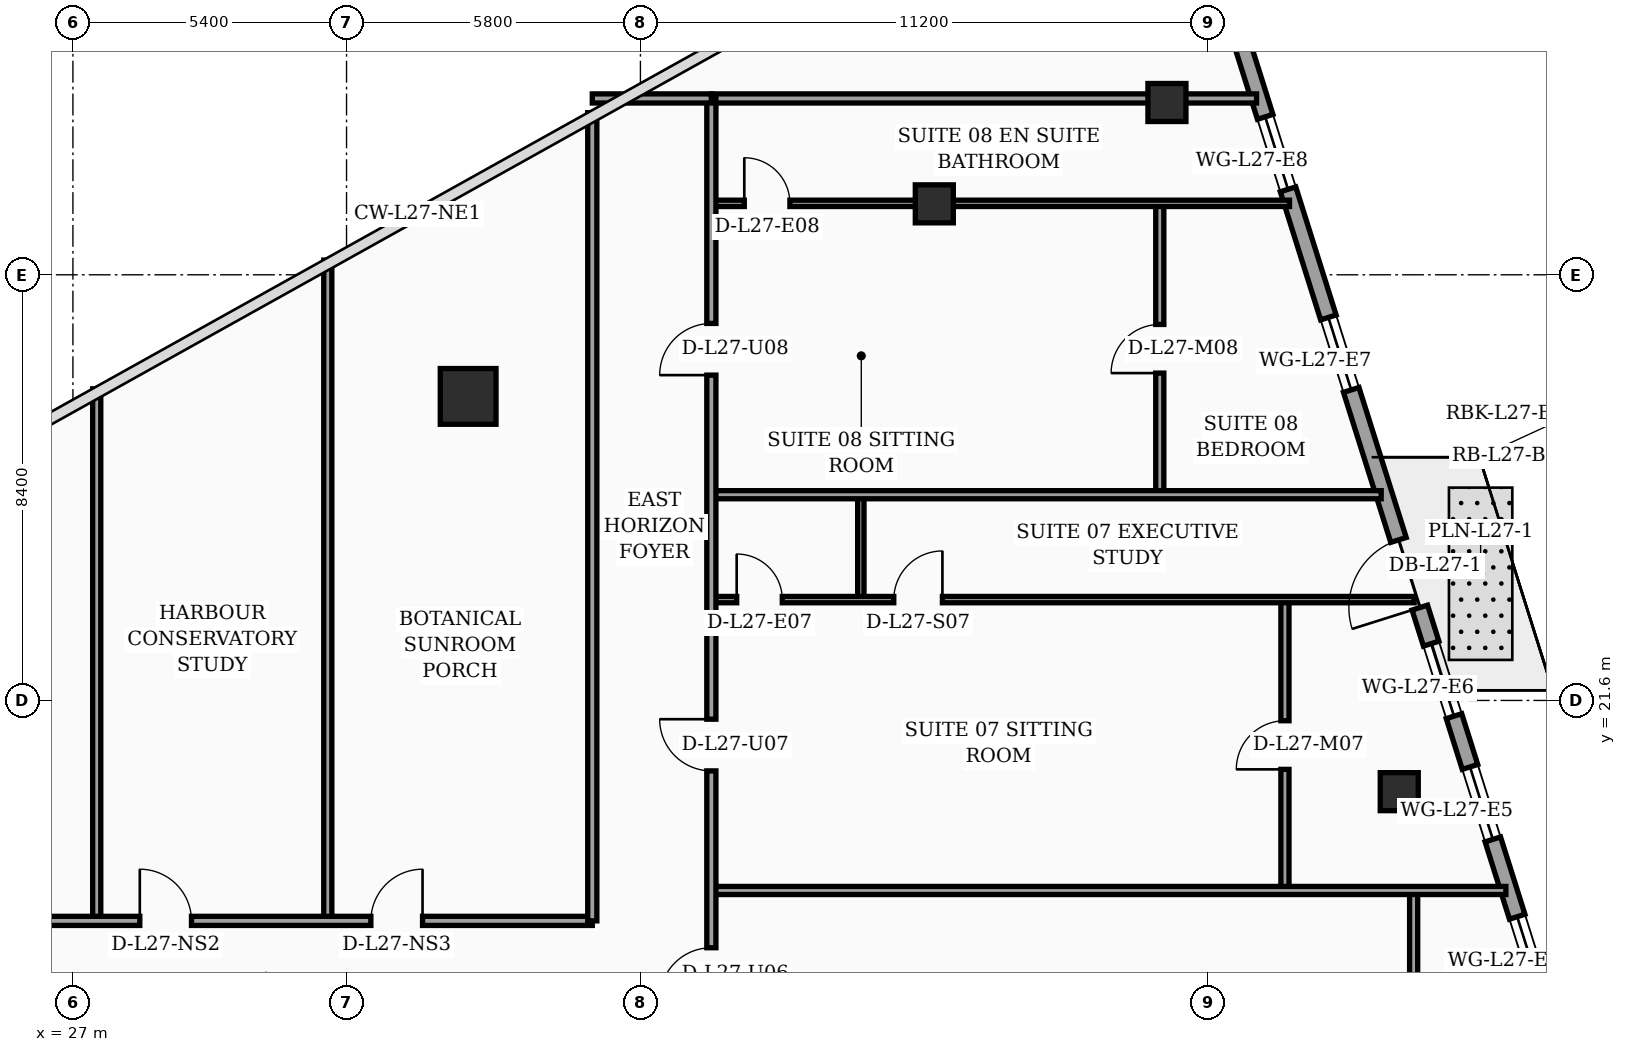
"""IFC4 building model, lengths in metres.
Left out: names, types, materials, properties, quantities, classifications, styles, units other than length and angle.
Written with IfcOpenShell. Run it as: python <this file> out.ifc"""

import sys

from ifc_helpers import new_model, si_unit, direction, frame, frame_2d, origin, origin_2d, place, context, subcontext, project, spatial, rectangle, hollow_rectangle, circle, extrude, element, fill, save


model = new_model("IFC4")
c1 = context("Model", 3, precision=1e-05, world=origin(), true_north=direction((0.0, 1.0)))
c2 = subcontext(c1, "Body", "Model", "MODEL_VIEW")
j1 = project(units=[si_unit("LENGTHUNIT", "METRE"), si_unit("PLANEANGLEUNIT", "RADIAN")], contexts=[c1])
p1 = place(None, origin())
s1 = spatial("IfcSite", under=j1, at=p1, CompositionType="ELEMENT")
p2 = place(p1, origin())
s2 = spatial("IfcBuilding", under=s1, at=p2, CompositionType="ELEMENT")
p3 = place(p2, frame((0.0, 0.0, 112.6)))
s3 = spatial("IfcBuildingStorey", under=s2, at=p3, CompositionType="ELEMENT", Elevation=112.6)
p4 = place(p3, frame((34.8, 27.6, 0.0), z_axis=(0.0, 0.0, 1.0), x_axis=(1.0, 0.0, 0.0)))
e1 = element("IfcColumn", 1, at=p4, inside=s3, PredefinedType="COLUMN", context=c2, shape_type="SweptSolid", body=[
    extrude(circle(Radius=0.55, at=origin_2d()), origin(), (0.0, 0.0, 1.0), 3.56),
])
for number, where, z_axis, x_axis in (
    (2, (44.0, 31.4, 0.0), (0.0, 0.0, 1.0), (1.0, 0.0, 0.0)),
    (3, (53.176, 19.8, 0.0), (0.0, 0.0, 1.0), (1.0, 0.0, 0.0)),
    (4, (48.591, 33.4, 0.0), (0.0, 0.0, 1.0), (1.0, 0.0, 0.0)),
):
    element("IfcColumn", number, at=place(p3, frame(where, z_axis=z_axis, x_axis=x_axis)), inside=s3, PredefinedType="COLUMN", context=c2, shape_type="SweptSolid", body=[
        extrude(hollow_rectangle(XDim=0.75, YDim=0.75, WallThickness=0.032, at=origin_2d()), origin(), (0.0, 0.0, 1.0), 3.56),
    ])
p5 = place(p3, frame((59.23, 5.505, 0.0), z_axis=(0.0, 0.0, 1.0), x_axis=(-0.300509063924, 0.953778958931, 0.0)))
e5 = element("IfcWall", 5, at=p5, inside=s3, PredefinedType="SOLIDWALL", context=c2, shape_type="SweptSolid", body=[
    extrude(rectangle(XDim=30.814, YDim=0.32, at=frame_2d((15.407, 0.0))), origin(), (0.0, 0.0, 1.0), 3.56),
])
p6 = place(p5, frame((18.796, 0.0, 0.0)))
e6 = element("IfcOpeningElement", 6, at=p6, cuts=e5, PredefinedType="OPENING", context=c2, shape_type="SweptSolid", body=[
    extrude(rectangle(XDim=1.4, YDim=2.25, at=frame_2d((0.7, 1.125))), frame((0.0, 0.17, 0.0), z_axis=(0.0, -1.0, 0.0), x_axis=(1.0, 0.0, 0.0)), (0.0, 0.0, 1.0), 0.34),
])
p7 = place(p5, frame((2.65, 0.0, 0.75)))
e7 = element("IfcOpeningElement", 7, at=p7, cuts=e5, PredefinedType="OPENING", context=c2, shape_type="SweptSolid", body=[
    extrude(rectangle(XDim=1.5, YDim=1.6, at=frame_2d((0.75, 0.8))), frame((0.0, 0.17, 0.0), z_axis=(0.0, -1.0, 0.0), x_axis=(1.0, 0.0, 0.0)), (0.0, 0.0, 1.0), 0.34),
])
p8 = place(p5, frame((4.7, 0.0, 0.75)))
e8 = element("IfcOpeningElement", 8, at=p8, cuts=e5, PredefinedType="OPENING", context=c2, shape_type="SweptSolid", body=[
    extrude(rectangle(XDim=1.5, YDim=1.6, at=frame_2d((0.75, 0.8))), frame((0.0, 0.17, 0.0), z_axis=(0.0, -1.0, 0.0), x_axis=(1.0, 0.0, 0.0)), (0.0, 0.0, 1.0), 0.34),
])
p9 = place(p5, frame((7.8, 0.0, 0.75)))
e9 = element("IfcOpeningElement", 9, at=p9, cuts=e5, PredefinedType="OPENING", context=c2, shape_type="SweptSolid", body=[
    extrude(rectangle(XDim=1.5, YDim=1.6, at=frame_2d((0.75, 0.8))), frame((0.0, 0.17, 0.0), z_axis=(0.0, -1.0, 0.0), x_axis=(1.0, 0.0, 0.0)), (0.0, 0.0, 1.0), 0.34),
])
p10 = place(p5, frame((10.9, 0.0, 0.75)))
e10 = element("IfcOpeningElement", 10, at=p10, cuts=e5, PredefinedType="OPENING", context=c2, shape_type="SweptSolid", body=[
    extrude(rectangle(XDim=1.5, YDim=1.6, at=frame_2d((0.75, 0.8))), frame((0.0, 0.17, 0.0), z_axis=(0.0, -1.0, 0.0), x_axis=(1.0, 0.0, 0.0)), (0.0, 0.0, 1.0), 0.34),
])
p11 = place(p5, frame((14.0, 0.0, 0.75)))
e11 = element("IfcOpeningElement", 11, at=p11, cuts=e5, PredefinedType="OPENING", context=c2, shape_type="SweptSolid", body=[
    extrude(rectangle(XDim=1.5, YDim=1.6, at=frame_2d((0.75, 0.8))), frame((0.0, 0.17, 0.0), z_axis=(0.0, -1.0, 0.0), x_axis=(1.0, 0.0, 0.0)), (0.0, 0.0, 1.0), 0.34),
])
p12 = place(p5, frame((16.55, 0.0, 0.75)))
e12 = element("IfcOpeningElement", 12, at=p12, cuts=e5, PredefinedType="OPENING", context=c2, shape_type="SweptSolid", body=[
    extrude(rectangle(XDim=1.5, YDim=1.6, at=frame_2d((0.75, 0.8))), frame((0.0, 0.17, 0.0), z_axis=(0.0, -1.0, 0.0), x_axis=(1.0, 0.0, 0.0)), (0.0, 0.0, 1.0), 0.34),
])
p13 = place(p5, frame((23.3, 0.0, 0.75)))
e13 = element("IfcOpeningElement", 13, at=p13, cuts=e5, PredefinedType="OPENING", context=c2, shape_type="SweptSolid", body=[
    extrude(rectangle(XDim=1.5, YDim=1.6, at=frame_2d((0.75, 0.8))), frame((0.0, 0.17, 0.0), z_axis=(0.0, -1.0, 0.0), x_axis=(1.0, 0.0, 0.0)), (0.0, 0.0, 1.0), 0.34),
])
p14 = place(p5, frame((27.45, 0.0, 0.75)))
e14 = element("IfcOpeningElement", 14, at=p14, cuts=e5, PredefinedType="OPENING", context=c2, shape_type="SweptSolid", body=[
    extrude(rectangle(XDim=1.5, YDim=1.6, at=frame_2d((0.75, 0.8))), frame((0.0, 0.17, 0.0), z_axis=(0.0, -1.0, 0.0), x_axis=(1.0, 0.0, 0.0)), (0.0, 0.0, 1.0), 0.34),
])
p15 = place(p3, frame((27.47, 17.25, 0.0), z_axis=(0.0, 0.0, 1.0), x_axis=(0.0, 1.0, 0.0)))
e15 = element("IfcWall", 15, at=p15, inside=s3, PredefinedType="PARTITIONING", context=c2, shape_type="SweptSolid", body=[
    extrude(rectangle(XDim=10.5, YDim=0.16, at=frame_2d((5.25, 0.0))), origin(), (0.0, 0.0, 1.0), 2.84),
])
p16 = place(p3, frame((32.03, 17.25, 0.0), z_axis=(0.0, 0.0, 1.0), x_axis=(0.0, 1.0, 0.0)))
e16 = element("IfcWall", 16, at=p16, inside=s3, PredefinedType="PARTITIONING", context=c2, shape_type="SweptSolid", body=[
    extrude(rectangle(XDim=13.04, YDim=0.16, at=frame_2d((6.52, 0.0))), origin(), (0.0, 0.0, 1.0), 2.84),
])
p17 = place(p3, frame((21.5, 17.25, 0.0), z_axis=(0.0, 0.0, 1.0), x_axis=(1.0, 0.0, 0.0)))
e17 = element("IfcWall", 17, at=p17, inside=s3, PredefinedType="PARTITIONING", context=c2, shape_type="SweptSolid", body=[
    extrude(rectangle(XDim=15.75, YDim=0.18, at=frame_2d((7.875, 0.0))), origin(), (0.0, 0.0, 1.0), 2.84),
])
p18 = place(p17, frame((0.95, 0.0, 0.0)))
e18 = element("IfcOpeningElement", 18, at=p18, cuts=e17, PredefinedType="OPENING", context=c2, shape_type="SweptSolid", body=[
    extrude(rectangle(XDim=1.02, YDim=2.2, at=frame_2d((0.51, 1.1))), frame((0.0, 0.1, 0.0), z_axis=(0.0, -1.0, 0.0), x_axis=(1.0, 0.0, 0.0)), (0.0, 0.0, 1.0), 0.2),
])
p19 = place(p17, frame((6.82, 0.0, 0.0)))
e19 = element("IfcOpeningElement", 19, at=p19, cuts=e17, PredefinedType="OPENING", context=c2, shape_type="SweptSolid", body=[
    extrude(rectangle(XDim=1.02, YDim=2.2, at=frame_2d((0.51, 1.1))), frame((0.0, 0.1, 0.0), z_axis=(0.0, -1.0, 0.0), x_axis=(1.0, 0.0, 0.0)), (0.0, 0.0, 1.0), 0.2),
])
p20 = place(p17, frame((11.38, 0.0, 0.0)))
e20 = element("IfcOpeningElement", 20, at=p20, cuts=e17, PredefinedType="OPENING", context=c2, shape_type="SweptSolid", body=[
    extrude(rectangle(XDim=1.02, YDim=2.2, at=frame_2d((0.51, 1.1))), frame((0.0, 0.1, 0.0), z_axis=(0.0, -1.0, 0.0), x_axis=(1.0, 0.0, 0.0)), (0.0, 0.0, 1.0), 0.2),
])
p21 = place(p3, frame((37.25, 17.25, 0.0), z_axis=(0.0, 0.0, 1.0), x_axis=(0.0, 1.0, 0.0)))
e21 = element("IfcWall", 21, at=p21, inside=s3, PredefinedType="PARTITIONING", context=c2, shape_type="SweptSolid", body=[
    extrude(rectangle(XDim=15.95, YDim=0.18, at=frame_2d((7.975, 0.0))), origin(), (0.0, 0.0, 1.0), 2.84),
])
p22 = place(p3, frame((53.46, 7.45, 0.0), z_axis=(0.0, 0.0, 1.0), x_axis=(0.0, 1.0, 0.0)))
e22 = element("IfcWall", 22, at=p22, inside=s3, PredefinedType="PARTITIONING", context=c2, shape_type="SweptSolid", body=[
    extrude(rectangle(XDim=10.4, YDim=0.16, at=frame_2d((5.2, 0.0))), origin(), (0.0, 0.0, 1.0), 3.04),
])
p23 = place(p22, frame((4.72, 0.0, 0.0)))
e23 = element("IfcOpeningElement", 23, at=p23, cuts=e22, PredefinedType="OPENING", context=c2, shape_type="SweptSolid", body=[
    extrude(rectangle(XDim=0.96, YDim=2.2, at=frame_2d((0.48, 1.1))), frame((0.0, 0.09, 0.0), z_axis=(0.0, -1.0, 0.0), x_axis=(1.0, 0.0, 0.0)), (0.0, 0.0, 1.0), 0.18),
])
p24 = place(p3, frame((42.55, 23.59, 0.0), z_axis=(0.0, 0.0, 1.0), x_axis=(0.0, 1.0, 0.0)))
e24 = element("IfcWall", 24, at=p24, inside=s3, PredefinedType="PARTITIONING", context=c2, shape_type="SweptSolid", body=[
    extrude(rectangle(XDim=2.07, YDim=0.125, at=frame_2d((1.035, 0.0))), origin(), (0.0, 0.0, 1.0), 3.19),
])
p25 = place(p3, frame((50.92, 17.85, 0.0), z_axis=(0.0, 0.0, 1.0), x_axis=(0.0, 1.0, 0.0)))
e25 = element("IfcWall", 25, at=p25, inside=s3, PredefinedType="PARTITIONING", context=c2, shape_type="SweptSolid", body=[
    extrude(rectangle(XDim=5.74, YDim=0.16, at=frame_2d((2.87, 0.0))), origin(), (0.0, 0.0, 1.0), 2.84),
])
p26 = place(p25, frame((2.39, 0.0, 0.0)))
e26 = element("IfcOpeningElement", 26, at=p26, cuts=e25, PredefinedType="OPENING", context=c2, shape_type="SweptSolid", body=[
    extrude(rectangle(XDim=0.96, YDim=2.2, at=frame_2d((0.48, 1.1))), frame((0.0, 0.09, 0.0), z_axis=(0.0, -1.0, 0.0), x_axis=(1.0, 0.0, 0.0)), (0.0, 0.0, 1.0), 0.18),
])
p27 = place(p3, frame((39.6, 23.59, 0.0), z_axis=(0.0, 0.0, 1.0), x_axis=(1.0, 0.0, 0.0)))
e27 = element("IfcWall", 27, at=p27, inside=s3, PredefinedType="PARTITIONING", context=c2, shape_type="SweptSolid", body=[
    extrude(rectangle(XDim=13.87, YDim=0.125, at=frame_2d((6.935, 0.0))), origin(), (0.0, 0.0, 1.0), 2.84),
])
p28 = place(p27, frame((0.5, 0.0, 0.0)))
e28 = element("IfcOpeningElement", 28, at=p28, cuts=e27, PredefinedType="OPENING", context=c2, shape_type="SweptSolid", body=[
    extrude(rectangle(XDim=0.9, YDim=2.15, at=frame_2d((0.45, 1.075))), frame((0.0, 0.073, 0.0), z_axis=(0.0, -1.0, 0.0), x_axis=(1.0, 0.0, 0.0)), (0.0, 0.0, 1.0), 0.145),
])
p29 = place(p27, frame((3.6, 0.0, 0.0)))
e29 = element("IfcOpeningElement", 29, at=p29, cuts=e27, PredefinedType="OPENING", context=c2, shape_type="SweptSolid", body=[
    extrude(rectangle(XDim=0.96, YDim=2.2, at=frame_2d((0.48, 1.1))), frame((0.0, 0.073, 0.0), z_axis=(0.0, -1.0, 0.0), x_axis=(1.0, 0.0, 0.0)), (0.0, 0.0, 1.0), 0.145),
])
p30 = place(p3, frame((48.45, 25.66, 0.0), z_axis=(0.0, 0.0, 1.0), x_axis=(0.0, 1.0, 0.0)))
e30 = element("IfcWall", 30, at=p30, inside=s3, PredefinedType="PARTITIONING", context=c2, shape_type="SweptSolid", body=[
    extrude(rectangle(XDim=5.75, YDim=0.16, at=frame_2d((2.875, 0.0))), origin(), (0.0, 0.0, 1.0), 3.09),
])
p31 = place(p30, frame((2.4, 0.0, 0.0)))
e31 = element("IfcOpeningElement", 31, at=p31, cuts=e30, PredefinedType="OPENING", context=c2, shape_type="SweptSolid", body=[
    extrude(rectangle(XDim=0.96, YDim=2.2, at=frame_2d((0.48, 1.1))), frame((0.0, 0.09, 0.0), z_axis=(0.0, -1.0, 0.0), x_axis=(1.0, 0.0, 0.0)), (0.0, 0.0, 1.0), 0.18),
])
p32 = place(p3, frame((39.6, 31.41, 0.0), z_axis=(0.0, 0.0, 1.0), x_axis=(1.0, 0.0, 0.0)))
e32 = element("IfcWall", 32, at=p32, inside=s3, PredefinedType="PARTITIONING", context=c2, shape_type="SweptSolid", body=[
    extrude(rectangle(XDim=11.41, YDim=0.125, at=frame_2d((5.705, 0.0))), origin(), (0.0, 0.0, 1.0), 2.84),
])
p33 = place(p32, frame((0.65, 0.0, 0.0)))
e33 = element("IfcOpeningElement", 33, at=p33, cuts=e32, PredefinedType="OPENING", context=c2, shape_type="SweptSolid", body=[
    extrude(rectangle(XDim=0.9, YDim=2.15, at=frame_2d((0.45, 1.075))), frame((0.0, 0.073, 0.0), z_axis=(0.0, -1.0, 0.0), x_axis=(1.0, 0.0, 0.0)), (0.0, 0.0, 1.0), 0.145),
])
p34 = place(p3, frame((39.6, 25.66, 0.0), z_axis=(0.0, 0.0, 1.0), x_axis=(1.0, 0.0, 0.0)))
e34 = element("IfcWall", 34, at=p34, inside=s3, PredefinedType="PARTITIONING", context=c2, shape_type="SweptSolid", body=[
    extrude(rectangle(XDim=13.22, YDim=0.16, at=frame_2d((6.61, 0.0))), origin(), (0.0, 0.0, 1.0), 2.84),
])
p35 = place(p3, frame((39.6, 17.85, 0.0), z_axis=(0.0, 0.0, 1.0), x_axis=(1.0, 0.0, 0.0)))
e35 = element("IfcWall", 35, at=p35, inside=s3, PredefinedType="PARTITIONING", context=c2, shape_type="SweptSolid", body=[
    extrude(rectangle(XDim=15.68, YDim=0.16, at=frame_2d((7.84, 0.0))), origin(), (0.0, 0.0, 1.0), 2.84),
])
p36 = place(p3, frame((39.6, 33.48, 0.0), z_axis=(0.0, 0.0, 1.0), x_axis=(1.0, 0.0, 0.0)))
e36 = element("IfcWall", 36, at=p36, inside=s3, PredefinedType="PARTITIONING", context=c2, shape_type="SweptSolid", body=[
    extrude(rectangle(XDim=10.76, YDim=0.18, at=frame_2d((5.38, 0.0))), origin(), (0.0, 0.0, 1.0), 2.84),
])
p37 = place(p3, frame((39.6, 2.44, 0.0), z_axis=(0.0, 0.0, 1.0), x_axis=(0.0, 1.0, 0.0)))
e37 = element("IfcWall", 37, at=p37, inside=s3, PredefinedType="PARTITIONING", context=c2, shape_type="SweptSolid", body=[
    extrude(rectangle(XDim=31.04, YDim=0.18, at=frame_2d((15.52, 0.0))), origin(), (0.0, 0.0, 1.0), 2.84),
])
p38 = place(p37, frame((13.26, 0.0, 0.0)))
e38 = element("IfcOpeningElement", 38, at=p38, cuts=e37, PredefinedType="OPENING", context=c2, shape_type="SweptSolid", body=[
    extrude(rectangle(XDim=1.02, YDim=2.2, at=frame_2d((0.51, 1.1))), frame((0.0, 0.1, 0.0), z_axis=(0.0, -1.0, 0.0), x_axis=(1.0, 0.0, 0.0)), (0.0, 0.0, 1.0), 0.2),
])
p39 = place(p37, frame((17.77, 0.0, 0.0)))
e39 = element("IfcOpeningElement", 39, at=p39, cuts=e37, PredefinedType="OPENING", context=c2, shape_type="SweptSolid", body=[
    extrude(rectangle(XDim=1.02, YDim=2.2, at=frame_2d((0.51, 1.1))), frame((0.0, 0.1, 0.0), z_axis=(0.0, -1.0, 0.0), x_axis=(1.0, 0.0, 0.0)), (0.0, 0.0, 1.0), 0.2),
])
p40 = place(p37, frame((25.58, 0.0, 0.0)))
e40 = element("IfcOpeningElement", 40, at=p40, cuts=e37, PredefinedType="OPENING", context=c2, shape_type="SweptSolid", body=[
    extrude(rectangle(XDim=1.02, YDim=2.2, at=frame_2d((0.51, 1.1))), frame((0.0, 0.1, 0.0), z_axis=(0.0, -1.0, 0.0), x_axis=(1.0, 0.0, 0.0)), (0.0, 0.0, 1.0), 0.2),
])
p41 = place(p3, frame((37.25, 33.48, 0.0), z_axis=(0.0, 0.0, 1.0), x_axis=(1.0, 0.0, 0.0)))
e41 = element("IfcWall", 41, at=p41, inside=s3, PredefinedType="PARTITIONING", context=c2, shape_type="SweptSolid", body=[
    extrude(rectangle(XDim=2.35, YDim=0.18, at=frame_2d((1.175, 0.0))), origin(), (0.0, 0.0, 1.0), 3.56),
])
p42 = place(p6, origin())
e42 = element("IfcDoor", 42, at=p42, inside=s3, OperationType="SINGLE_SWING_LEFT", PredefinedType="DOOR", context=c2, shape_type="SweptSolid", body=[
    extrude(rectangle(XDim=1.4, YDim=2.25, at=frame_2d((0.7, 1.125))), frame((0.0, 0.025, 0.0), z_axis=(0.0, -1.0, 0.0), x_axis=(1.0, 0.0, 0.0)), (0.0, 0.0, 1.0), 0.05),
])
fill(e6, e42)
p43 = place(p10, origin())
e43 = element("IfcWindow", 43, at=p43, inside=s3, PartitioningType="SINGLE_PANEL", PredefinedType="WINDOW", context=c2, shape_type="SweptSolid", body=[
    extrude(rectangle(XDim=1.5, YDim=1.6, at=frame_2d((0.75, 0.8))), frame((0.0, 0.03, 0.0), z_axis=(0.0, -1.0, 0.0), x_axis=(1.0, 0.0, 0.0)), (0.0, 0.0, 1.0), 0.06),
])
fill(e10, e43)
p44 = place(p11, origin())
e44 = element("IfcWindow", 44, at=p44, inside=s3, PartitioningType="SINGLE_PANEL", PredefinedType="WINDOW", context=c2, shape_type="SweptSolid", body=[
    extrude(rectangle(XDim=1.5, YDim=1.6, at=frame_2d((0.75, 0.8))), frame((0.0, 0.03, 0.0), z_axis=(0.0, -1.0, 0.0), x_axis=(1.0, 0.0, 0.0)), (0.0, 0.0, 1.0), 0.06),
])
fill(e11, e44)
p45 = place(p12, origin())
e45 = element("IfcWindow", 45, at=p45, inside=s3, PartitioningType="SINGLE_PANEL", PredefinedType="WINDOW", context=c2, shape_type="SweptSolid", body=[
    extrude(rectangle(XDim=1.5, YDim=1.6, at=frame_2d((0.75, 0.8))), frame((0.0, 0.03, 0.0), z_axis=(0.0, -1.0, 0.0), x_axis=(1.0, 0.0, 0.0)), (0.0, 0.0, 1.0), 0.06),
])
fill(e12, e45)
p46 = place(p13, origin())
e46 = element("IfcWindow", 46, at=p46, inside=s3, PartitioningType="SINGLE_PANEL", PredefinedType="WINDOW", context=c2, shape_type="SweptSolid", body=[
    extrude(rectangle(XDim=1.5, YDim=1.6, at=frame_2d((0.75, 0.8))), frame((0.0, 0.03, 0.0), z_axis=(0.0, -1.0, 0.0), x_axis=(1.0, 0.0, 0.0)), (0.0, 0.0, 1.0), 0.06),
])
fill(e13, e46)
p47 = place(p14, origin())
e47 = element("IfcWindow", 47, at=p47, inside=s3, PartitioningType="SINGLE_PANEL", PredefinedType="WINDOW", context=c2, shape_type="SweptSolid", body=[
    extrude(rectangle(XDim=1.5, YDim=1.6, at=frame_2d((0.75, 0.8))), frame((0.0, 0.03, 0.0), z_axis=(0.0, -1.0, 0.0), x_axis=(1.0, 0.0, 0.0)), (0.0, 0.0, 1.0), 0.06),
])
fill(e14, e47)
p48 = place(p19, origin())
e48 = element("IfcDoor", 48, at=p48, inside=s3, OperationType="SINGLE_SWING_LEFT", PredefinedType="DOOR", context=c2, shape_type="SweptSolid", body=[
    extrude(rectangle(XDim=1.02, YDim=2.2, at=frame_2d((0.51, 1.1))), frame((0.0, 0.025, 0.0), z_axis=(0.0, -1.0, 0.0), x_axis=(1.0, 0.0, 0.0)), (0.0, 0.0, 1.0), 0.05),
])
fill(e19, e48)
p49 = place(p20, origin())
e49 = element("IfcDoor", 49, at=p49, inside=s3, OperationType="SINGLE_SWING_RIGHT", PredefinedType="DOOR", context=c2, shape_type="SweptSolid", body=[
    extrude(rectangle(XDim=1.02, YDim=2.2, at=frame_2d((0.51, 1.1))), frame((0.0, 0.025, 0.0), z_axis=(0.0, -1.0, 0.0), x_axis=(1.0, 0.0, 0.0)), (0.0, 0.0, 1.0), 0.05),
])
fill(e20, e49)
p50 = place(p26, origin())
e50 = element("IfcDoor", 50, at=p50, inside=s3, OperationType="SINGLE_SWING_LEFT", PredefinedType="DOOR", context=c2, shape_type="SweptSolid", body=[
    extrude(rectangle(XDim=0.96, YDim=2.2, at=frame_2d((0.48, 1.1))), frame((0.0, 0.025, 0.0), z_axis=(0.0, -1.0, 0.0), x_axis=(1.0, 0.0, 0.0)), (0.0, 0.0, 1.0), 0.05),
])
fill(e26, e50)
p51 = place(p28, origin())
e51 = element("IfcDoor", 51, at=p51, inside=s3, OperationType="SINGLE_SWING_LEFT", PredefinedType="DOOR", context=c2, shape_type="SweptSolid", body=[
    extrude(rectangle(XDim=0.9, YDim=2.15, at=frame_2d((0.45, 1.075))), frame((0.0, 0.025, 0.0), z_axis=(0.0, -1.0, 0.0), x_axis=(1.0, 0.0, 0.0)), (0.0, 0.0, 1.0), 0.05),
])
fill(e28, e51)
p52 = place(p29, origin())
e52 = element("IfcDoor", 52, at=p52, inside=s3, OperationType="SINGLE_SWING_RIGHT", PredefinedType="DOOR", context=c2, shape_type="SweptSolid", body=[
    extrude(rectangle(XDim=0.96, YDim=2.2, at=frame_2d((0.48, 1.1))), frame((0.0, 0.025, 0.0), z_axis=(0.0, -1.0, 0.0), x_axis=(1.0, 0.0, 0.0)), (0.0, 0.0, 1.0), 0.05),
])
fill(e29, e52)
p53 = place(p31, origin())
e53 = element("IfcDoor", 53, at=p53, inside=s3, OperationType="SINGLE_SWING_LEFT", PredefinedType="DOOR", context=c2, shape_type="SweptSolid", body=[
    extrude(rectangle(XDim=0.96, YDim=2.2, at=frame_2d((0.48, 1.1))), frame((0.0, 0.025, 0.0), z_axis=(0.0, -1.0, 0.0), x_axis=(1.0, 0.0, 0.0)), (0.0, 0.0, 1.0), 0.05),
])
fill(e31, e53)
p54 = place(p33, origin())
e54 = element("IfcDoor", 54, at=p54, inside=s3, OperationType="SINGLE_SWING_LEFT", PredefinedType="DOOR", context=c2, shape_type="SweptSolid", body=[
    extrude(rectangle(XDim=0.9, YDim=2.15, at=frame_2d((0.45, 1.075))), frame((0.0, 0.025, 0.0), z_axis=(0.0, -1.0, 0.0), x_axis=(1.0, 0.0, 0.0)), (0.0, 0.0, 1.0), 0.05),
])
fill(e33, e54)
p55 = place(p38, origin())
e55 = element("IfcDoor", 55, at=p55, inside=s3, OperationType="SINGLE_SWING_LEFT", PredefinedType="DOOR", context=c2, shape_type="SweptSolid", body=[
    extrude(rectangle(XDim=1.02, YDim=2.2, at=frame_2d((0.51, 1.1))), frame((0.0, 0.025, 0.0), z_axis=(0.0, -1.0, 0.0), x_axis=(1.0, 0.0, 0.0)), (0.0, 0.0, 1.0), 0.05),
])
fill(e38, e55)
p56 = place(p39, origin())
e56 = element("IfcDoor", 56, at=p56, inside=s3, OperationType="SINGLE_SWING_RIGHT", PredefinedType="DOOR", context=c2, shape_type="SweptSolid", body=[
    extrude(rectangle(XDim=1.02, YDim=2.2, at=frame_2d((0.51, 1.1))), frame((0.0, 0.025, 0.0), z_axis=(0.0, -1.0, 0.0), x_axis=(1.0, 0.0, 0.0)), (0.0, 0.0, 1.0), 0.05),
])
fill(e39, e56)
p57 = place(p40, origin())
e57 = element("IfcDoor", 57, at=p57, inside=s3, OperationType="SINGLE_SWING_LEFT", PredefinedType="DOOR", context=c2, shape_type="SweptSolid", body=[
    extrude(rectangle(XDim=1.02, YDim=2.2, at=frame_2d((0.51, 1.1))), frame((0.0, 0.025, 0.0), z_axis=(0.0, -1.0, 0.0), x_axis=(1.0, 0.0, 0.0)), (0.0, 0.0, 1.0), 0.05),
])
fill(e40, e57)
save(model, sys.argv[1])
